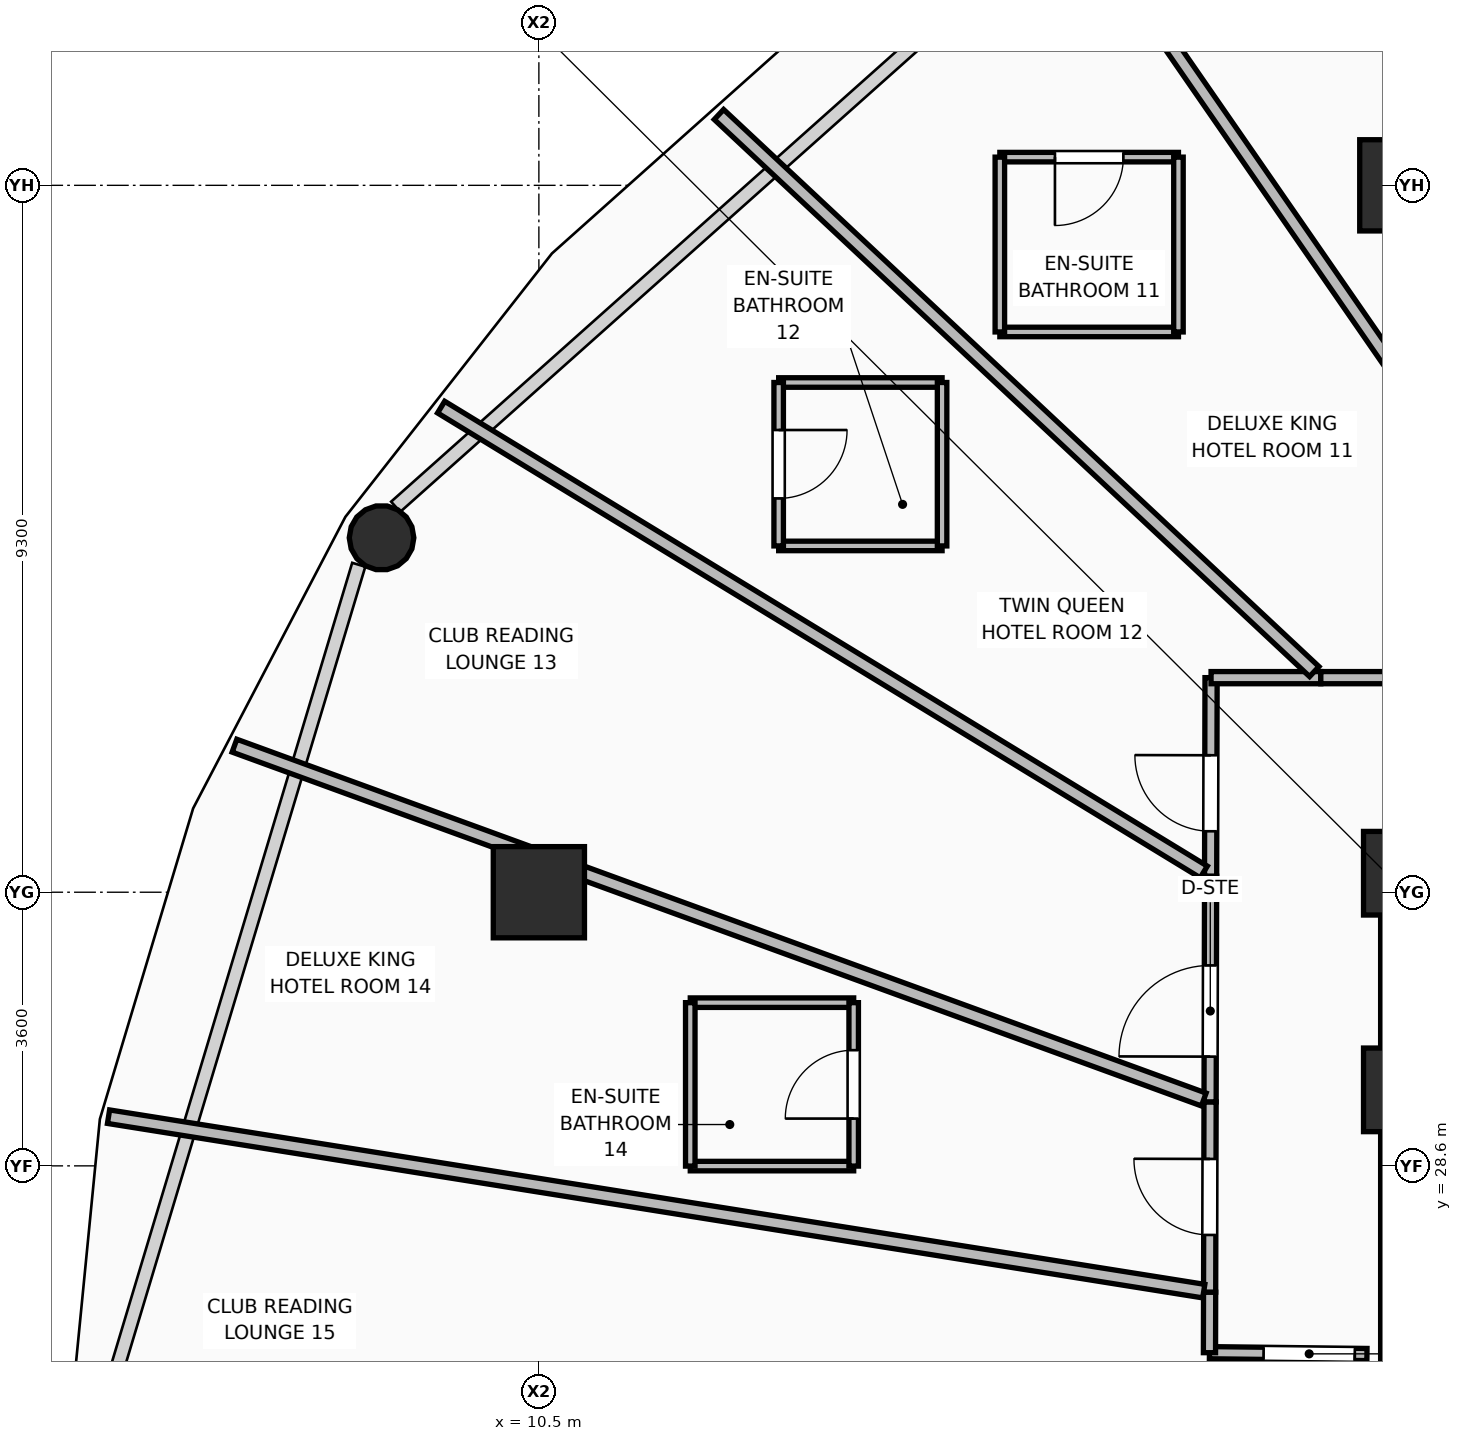
"""IFC4 building model, lengths in metres.
Left out: names, types, materials, properties, quantities, classifications, styles, units other than length and angle.
Written with IfcOpenShell. Run it as: python <this file> out.ifc"""

import sys

from ifc_helpers import new_model, si_unit, direction, frame, frame_2d, origin, origin_2d, place, context, subcontext, project, spatial, rectangle, hollow_rectangle, hollow_circle, extrude, element, fill, save


model = new_model("IFC4")
c1 = context("Model", 3, precision=1e-05, world=origin(), true_north=direction((0.0, 1.0)))
c2 = subcontext(c1, "Body", "Model", "MODEL_VIEW")
j1 = project(units=[si_unit("LENGTHUNIT", "METRE"), si_unit("PLANEANGLEUNIT", "RADIAN")], contexts=[c1])
p1 = place(None, origin())
s1 = spatial("IfcSite", under=j1, at=p1, CompositionType="ELEMENT")
p2 = place(p1, origin())
s2 = spatial("IfcBuilding", under=s1, at=p2, CompositionType="ELEMENT")
p3 = place(p2, frame((0.0, 0.0, 53.25)))
s3 = spatial("IfcBuildingStorey", under=s2, at=p3, CompositionType="ELEMENT", Elevation=53.25)
for number, where, z_axis, x_axis in (
    (1, (21.9, 29.6, 0.0), (0.0, 0.0, 1.0), (1.0, 0.0, 0.0)),
    (2, (21.9, 32.45, 0.0), (0.0, 0.0, 1.0), (1.0, 0.0, 0.0)),
):
    element("IfcColumn", number, at=place(p3, frame(where, z_axis=z_axis, x_axis=x_axis)), inside=s3, PredefinedType="COLUMN", context=c2, shape_type="SweptSolid", body=[
        extrude(rectangle(XDim=1.1, YDim=1.1, at=origin_2d()), origin(), (0.0, 0.0, 1.0), 3.75),
    ])
for number, where, z_axis, x_axis in (
    (3, (10.5, 32.2, 0.0), (0.0, 0.0, 1.0), (1.0, 0.0, 0.0)),
    (4, (21.9, 41.5, 0.0), (0.0, 0.0, 1.0), (1.0, 0.0, 0.0)),
):
    element("IfcColumn", number, at=place(p3, frame(where, z_axis=z_axis, x_axis=x_axis)), inside=s3, PredefinedType="COLUMN", context=c2, shape_type="SweptSolid", body=[
        extrude(hollow_rectangle(XDim=1.2, YDim=1.2, WallThickness=0.045, at=origin_2d()), origin(), (0.0, 0.0, 1.0), 3.75),
    ])
p4 = place(p3, frame((8.43, 36.863, 0.0), z_axis=(-0.192223999714, 0.099016391655, 0.976343017652), x_axis=(-0.45792701067, -0.888989793473, 0.0)))
e5 = element("IfcColumn", 5, at=p4, inside=s3, PredefinedType="COLUMN", context=c2, shape_type="SweptSolid", body=[
    extrude(hollow_circle(Radius=0.425, WallThickness=0.04, at=origin_2d()), origin(), (0.0, 0.0, 1.0), 3.656),
])
p5 = place(p3, frame((21.575, 32.45, 0.0), z_axis=(0.0, 0.0, 1.0), x_axis=(1.0, 0.0, 0.0)))
e6 = element("IfcWall", 6, at=p5, inside=s3, PredefinedType="SHEAR", context=c2, shape_type="SweptSolid", body=[
    extrude(rectangle(XDim=19.85, YDim=0.65, at=frame_2d((9.925, 0.0))), origin(), (0.0, 0.0, 1.0), 3.57),
])
p6 = place(p5, frame((2.175, 0.0, 0.0)))
e7 = element("IfcOpeningElement", 7, at=p6, cuts=e6, PredefinedType="OPENING", context=c2, shape_type="SweptSolid", body=[
    extrude(rectangle(XDim=1.1, YDim=2.1, at=frame_2d((0.55, 1.05))), frame((0.0, 0.335, 0.0), z_axis=(0.0, -1.0, 0.0), x_axis=(1.0, 0.0, 0.0)), (0.0, 0.0, 1.0), 0.67),
])
p7 = place(p5, frame((15.565, 0.0, 0.0)))
e8 = element("IfcOpeningElement", 8, at=p7, cuts=e6, PredefinedType="OPENING", context=c2, shape_type="SweptSolid", body=[
    extrude(rectangle(XDim=1.0, YDim=2.1, at=frame_2d((0.5, 1.05))), frame((0.0, 0.335, 0.0), z_axis=(0.0, -1.0, 0.0), x_axis=(1.0, 0.0, 0.0)), (0.0, 0.0, 1.0), 0.67),
])
p8 = place(p5, frame((17.575, 0.0, 0.0)))
e9 = element("IfcOpeningElement", 9, at=p8, cuts=e6, PredefinedType="OPENING", context=c2, shape_type="SweptSolid", body=[
    extrude(rectangle(XDim=0.9, YDim=2.1, at=frame_2d((0.45, 1.05))), frame((0.0, 0.335, 0.0), z_axis=(0.0, -1.0, 0.0), x_axis=(1.0, 0.0, 0.0)), (0.0, 0.0, 1.0), 0.67),
])
p9 = place(p3, frame((21.9, 18.125, 0.0), z_axis=(0.0, 0.0, 1.0), x_axis=(0.0, 1.0, 0.0)))
e10 = element("IfcWall", 10, at=p9, inside=s3, PredefinedType="SHEAR", context=c2, shape_type="SweptSolid", body=[
    extrude(rectangle(XDim=14.0, YDim=0.65, at=frame_2d((7.0, 0.0))), origin(), (0.0, 0.0, 1.0), 3.57),
])
p10 = place(p3, frame((21.395, 26.118, 0.0), z_axis=(0.0, 0.0, 1.0), x_axis=(-0.999931972005, 0.011664105718, 0.0)))
e11 = element("IfcWall", 11, at=p10, inside=s3, PredefinedType="PARTITIONING", context=c2, shape_type="SweptSolid", body=[
    extrude(rectangle(XDim=2.072, YDim=0.16, at=frame_2d((1.036, 0.0))), origin(), (0.0, 0.0, 1.0), 3.55),
])
p11 = place(p10, frame((0.16, 0.0, 0.0)))
e12 = element("IfcOpeningElement", 12, at=p11, cuts=e11, PredefinedType="OPENING", context=c2, shape_type="SweptSolid", body=[
    extrude(rectangle(XDim=1.2, YDim=2.1, at=frame_2d((0.6, 1.05))), frame((0.0, 0.09, 0.0), z_axis=(0.0, -1.0, 0.0), x_axis=(1.0, 0.0, 0.0)), (0.0, 0.0, 1.0), 0.18),
])
p12 = place(p3, frame((19.323, 26.142, 0.0), z_axis=(0.0, 0.0, 1.0), x_axis=(0.00245097303, 0.999996996361, 0.0)))
e13 = element("IfcWall", 13, at=p12, inside=s3, PredefinedType="PARTITIONING", context=c2, shape_type="SweptSolid", body=[
    extrude(rectangle(XDim=0.797, YDim=0.16, at=frame_2d((0.398, 0.0))), origin(), (0.0, 0.0, 1.0), 3.55),
])
p13 = place(p3, frame((19.325, 26.939, 0.0), z_axis=(0.0, 0.0, 1.0), x_axis=(0.002438541325, 0.999997026754, 0.0)))
e14 = element("IfcWall", 14, at=p13, inside=s3, PredefinedType="PARTITIONING", context=c2, shape_type="SweptSolid", body=[
    extrude(rectangle(XDim=2.503, YDim=0.16, at=frame_2d((1.251, 0.0))), origin(), (0.0, 0.0, 1.0), 3.55),
])
p14 = place(p13, frame((0.752, 0.0, 0.0)))
e15 = element("IfcOpeningElement", 15, at=p14, cuts=e14, PredefinedType="OPENING", context=c2, shape_type="SweptSolid", body=[
    extrude(rectangle(XDim=1.0, YDim=2.1, at=frame_2d((0.5, 1.05))), frame((0.0, 0.09, 0.0), z_axis=(0.0, -1.0, 0.0), x_axis=(1.0, 0.0, 0.0)), (0.0, 0.0, 1.0), 0.18),
])
p15 = place(p3, frame((19.331, 29.442, 0.0), z_axis=(0.0, 0.0, 1.0), x_axis=(0.002301489877, 0.999997351569, 0.0)))
e16 = element("IfcWall", 16, at=p15, inside=s3, PredefinedType="PARTITIONING", context=c2, shape_type="SweptSolid", body=[
    extrude(rectangle(XDim=2.97, YDim=0.16, at=frame_2d((1.485, 0.0))), origin(), (0.0, 0.0, 1.0), 3.55),
])
p16 = place(p15, frame((0.595, 0.0, 0.0)))
e17 = element("IfcOpeningElement", 17, at=p16, cuts=e16, PredefinedType="OPENING", context=c2, shape_type="SweptSolid", body=[
    extrude(rectangle(XDim=1.2, YDim=2.1, at=frame_2d((0.6, 1.05))), frame((0.0, 0.09, 0.0), z_axis=(0.0, -1.0, 0.0), x_axis=(1.0, 0.0, 0.0)), (0.0, 0.0, 1.0), 0.18),
])
p17 = place(p3, frame((19.338, 32.412, 0.0), z_axis=(0.0, 0.0, 1.0), x_axis=(0.002337753103, 0.999997267451, 0.0)))
e18 = element("IfcWall", 18, at=p17, inside=s3, PredefinedType="PARTITIONING", context=c2, shape_type="SweptSolid", body=[
    extrude(rectangle(XDim=2.611, YDim=0.16, at=frame_2d((1.305, 0.0))), origin(), (0.0, 0.0, 1.0), 2.928),
])
p18 = place(p17, frame((0.59, 0.0, 0.0)))
e19 = element("IfcOpeningElement", 19, at=p18, cuts=e18, PredefinedType="OPENING", context=c2, shape_type="SweptSolid", body=[
    extrude(rectangle(XDim=1.0, YDim=2.1, at=frame_2d((0.5, 1.05))), frame((0.0, 0.09, 0.0), z_axis=(0.0, -1.0, 0.0), x_axis=(1.0, 0.0, 0.0)), (0.0, 0.0, 1.0), 0.18),
])
p19 = place(p3, frame((19.344, 35.023, 0.0), z_axis=(0.0, 0.0, 1.0), x_axis=(1.0, 0.0, 0.0)))
e20 = element("IfcWall", 20, at=p19, inside=s3, PredefinedType="PARTITIONING", context=c2, shape_type="SweptSolid", body=[
    extrude(rectangle(XDim=1.444, YDim=0.16, at=frame_2d((0.722, 0.0))), origin(), (0.0, 0.0, 1.0), 3.55),
])
p20 = place(p3, frame((20.788, 35.023, 0.0), z_axis=(0.0, 0.0, 1.0), x_axis=(1.0, 0.0, 0.0)))
e21 = element("IfcWall", 21, at=p20, inside=s3, PredefinedType="PARTITIONING", context=c2, shape_type="SweptSolid", body=[
    extrude(rectangle(XDim=3.78, YDim=0.16, at=frame_2d((1.89, 0.0))), origin(), (0.0, 0.0, 1.0), 2.928),
])
p21 = place(p20, frame((2.186, 0.0, 0.0)))
e22 = element("IfcOpeningElement", 22, at=p21, cuts=e21, PredefinedType="OPENING", context=c2, shape_type="SweptSolid", body=[
    extrude(rectangle(XDim=1.0, YDim=2.1, at=frame_2d((0.5, 1.05))), frame((0.0, 0.09, 0.0), z_axis=(0.0, -1.0, 0.0), x_axis=(1.0, 0.0, 0.0)), (0.0, 0.0, 1.0), 0.18),
])
p22 = place(p3, frame((24.513, 35.103, 0.0), z_axis=(0.0, 0.0, 1.0), x_axis=(-0.568868408374, 0.822428558572, 0.0)))
e23 = element("IfcWall", 23, at=p22, inside=s3, PredefinedType="PARTITIONING", context=c2, shape_type="SweptSolid", body=[
    extrude(rectangle(XDim=12.676, YDim=0.18, at=frame_2d((6.338, 0.0))), origin(), (0.0, 0.0, 1.0), 2.775),
])
p23 = place(p3, frame((20.702, 35.103, 0.0), z_axis=(0.0, 0.0, 1.0), x_axis=(-0.730215371194, 0.683217031164, 0.0)))
e24 = element("IfcWall", 24, at=p23, inside=s3, PredefinedType="PARTITIONING", context=c2, shape_type="SweptSolid", body=[
    extrude(rectangle(XDim=10.727, YDim=0.18, at=frame_2d((5.364, 0.0))), origin(), (0.0, 0.0, 1.0), 2.775),
])
p24 = place(p3, frame((19.248, 32.467, 0.0), z_axis=(0.0, 0.0, 1.0), x_axis=(-0.853919589257, 0.520404972192, 0.0)))
e25 = element("IfcWall", 25, at=p24, inside=s3, PredefinedType="PARTITIONING", context=c2, shape_type="SweptSolid", body=[
    extrude(rectangle(XDim=11.75, YDim=0.18, at=frame_2d((5.875, 0.0))), origin(), (0.0, 0.0, 1.0), 2.775),
])
p25 = place(p3, frame((19.248, 29.473, 0.0), z_axis=(0.0, 0.0, 1.0), x_axis=(-0.939376353179, 0.34288783456, 0.0)))
e26 = element("IfcWall", 26, at=p25, inside=s3, PredefinedType="PARTITIONING", context=c2, shape_type="SweptSolid", body=[
    extrude(rectangle(XDim=13.576, YDim=0.18, at=frame_2d((6.788, 0.0))), origin(), (0.0, 0.0, 1.0), 2.775),
])
p26 = place(p3, frame((19.248, 26.952, 0.0), z_axis=(0.0, 0.0, 1.0), x_axis=(-0.987552205461, 0.157291581112, 0.0)))
e27 = element("IfcWall", 27, at=p26, inside=s3, PredefinedType="PARTITIONING", context=c2, shape_type="SweptSolid", body=[
    extrude(rectangle(XDim=14.592, YDim=0.18, at=frame_2d((7.296, 0.0))), origin(), (0.0, 0.0, 1.0), 2.775),
])
p27 = place(p3, frame((16.565, 39.571, 0.0), z_axis=(0.0, 0.0, 1.0), x_axis=(1.0, 0.0, 0.0)))
e28 = element("IfcWall", 28, at=p27, inside=s3, PredefinedType="PARTITIONING", context=c2, shape_type="SweptSolid", body=[
    extrude(rectangle(XDim=2.35, YDim=0.125, at=frame_2d((1.175, 0.0))), origin(), (0.0, 0.0, 1.0), 3.55),
])
p28 = place(p3, frame((16.565, 41.871, 0.0), z_axis=(0.0, 0.0, 1.0), x_axis=(1.0, 0.0, 0.0)))
e29 = element("IfcWall", 29, at=p28, inside=s3, PredefinedType="PARTITIONING", context=c2, shape_type="SweptSolid", body=[
    extrude(rectangle(XDim=2.35, YDim=0.125, at=frame_2d((1.175, 0.0))), origin(), (0.0, 0.0, 1.0), 2.928),
])
p29 = place(p28, frame((0.725, 0.0, 0.0)))
e30 = element("IfcOpeningElement", 30, at=p29, cuts=e29, PredefinedType="OPENING", context=c2, shape_type="SweptSolid", body=[
    extrude(rectangle(XDim=0.9, YDim=2.1, at=frame_2d((0.45, 1.05))), frame((0.0, 0.073, 0.0), z_axis=(0.0, -1.0, 0.0), x_axis=(1.0, 0.0, 0.0)), (0.0, 0.0, 1.0), 0.145),
])
p30 = place(p3, frame((16.565, 39.571, 0.0), z_axis=(0.0, 0.0, 1.0), x_axis=(0.0, 1.0, 0.0)))
e31 = element("IfcWall", 31, at=p30, inside=s3, PredefinedType="PARTITIONING", context=c2, shape_type="SweptSolid", body=[
    extrude(rectangle(XDim=2.3, YDim=0.125, at=frame_2d((1.15, 0.0))), origin(), (0.0, 0.0, 1.0), 3.55),
])
p31 = place(p3, frame((18.915, 39.571, 0.0), z_axis=(0.0, 0.0, 1.0), x_axis=(0.0, 1.0, 0.0)))
e32 = element("IfcWall", 32, at=p31, inside=s3, PredefinedType="PARTITIONING", context=c2, shape_type="SweptSolid", body=[
    extrude(rectangle(XDim=2.3, YDim=0.125, at=frame_2d((1.15, 0.0))), origin(), (0.0, 0.0, 1.0), 2.928),
])
for number, where, z_axis, x_axis in (
    (33, (13.655, 36.756, 0.0), (0.0, 0.0, 1.0), (1.0, 0.0, 0.0)),
    (34, (13.655, 38.906, 0.0), (0.0, 0.0, 1.0), (1.0, 0.0, 0.0)),
):
    element("IfcWall", number, at=place(p3, frame(where, z_axis=z_axis, x_axis=x_axis)), inside=s3, PredefinedType="PARTITIONING", context=c2, shape_type="SweptSolid", body=[
        extrude(rectangle(XDim=2.15, YDim=0.125, at=frame_2d((1.075, 0.0))), origin(), (0.0, 0.0, 1.0), 3.55),
    ])
p32 = place(p3, frame((13.655, 36.756, 0.0), z_axis=(0.0, 0.0, 1.0), x_axis=(0.0, 1.0, 0.0)))
e35 = element("IfcWall", 35, at=p32, inside=s3, PredefinedType="PARTITIONING", context=c2, shape_type="SweptSolid", body=[
    extrude(rectangle(XDim=2.15, YDim=0.125, at=frame_2d((1.075, 0.0))), origin(), (0.0, 0.0, 1.0), 3.55),
])
p33 = place(p32, frame((0.625, 0.0, 0.0)))
e36 = element("IfcOpeningElement", 36, at=p33, cuts=e35, PredefinedType="OPENING", context=c2, shape_type="SweptSolid", body=[
    extrude(rectangle(XDim=0.9, YDim=2.1, at=frame_2d((0.45, 1.05))), frame((0.0, 0.073, 0.0), z_axis=(0.0, -1.0, 0.0), x_axis=(1.0, 0.0, 0.0)), (0.0, 0.0, 1.0), 0.145),
])
p34 = place(p3, frame((15.805, 36.756, 0.0), z_axis=(0.0, 0.0, 1.0), x_axis=(0.0, 1.0, 0.0)))
e37 = element("IfcWall", 37, at=p34, inside=s3, PredefinedType="PARTITIONING", context=c2, shape_type="SweptSolid", body=[
    extrude(rectangle(XDim=2.15, YDim=0.125, at=frame_2d((1.075, 0.0))), origin(), (0.0, 0.0, 1.0), 3.55),
])
for number, where, z_axis, x_axis in (
    (38, (12.492, 28.597, 0.0), (0.0, 0.0, 1.0), (1.0, 0.0, 0.0)),
    (39, (12.492, 30.747, 0.0), (0.0, 0.0, 1.0), (1.0, 0.0, 0.0)),
    (40, (12.492, 28.597, 0.0), (0.0, 0.0, 1.0), (0.0, 1.0, 0.0)),
):
    element("IfcWall", number, at=place(p3, frame(where, z_axis=z_axis, x_axis=x_axis)), inside=s3, PredefinedType="PARTITIONING", context=c2, shape_type="SweptSolid", body=[
        extrude(rectangle(XDim=2.15, YDim=0.125, at=frame_2d((1.075, 0.0))), origin(), (0.0, 0.0, 1.0), 3.55),
    ])
p35 = place(p3, frame((14.642, 28.597, 0.0), z_axis=(0.0, 0.0, 1.0), x_axis=(0.0, 1.0, 0.0)))
e41 = element("IfcWall", 41, at=p35, inside=s3, PredefinedType="PARTITIONING", context=c2, shape_type="SweptSolid", body=[
    extrude(rectangle(XDim=2.15, YDim=0.125, at=frame_2d((1.075, 0.0))), origin(), (0.0, 0.0, 1.0), 3.55),
])
p36 = place(p35, frame((0.625, 0.0, 0.0)))
e42 = element("IfcOpeningElement", 42, at=p36, cuts=e41, PredefinedType="OPENING", context=c2, shape_type="SweptSolid", body=[
    extrude(rectangle(XDim=0.9, YDim=2.1, at=frame_2d((0.45, 1.05))), frame((0.0, 0.073, 0.0), z_axis=(0.0, -1.0, 0.0), x_axis=(1.0, 0.0, 0.0)), (0.0, 0.0, 1.0), 0.145),
])
p37 = place(p29, frame((0.9, 0.0, 0.0), z_axis=(0.0, 0.0, 1.0), x_axis=(-1.0, 0.0, 0.0)))
e43 = element("IfcDoor", 43, at=p37, inside=s3, OperationType="SINGLE_SWING_RIGHT", PredefinedType="DOOR", context=c2, shape_type="SweptSolid", body=[
    extrude(rectangle(XDim=0.9, YDim=2.1, at=frame_2d((0.45, 1.05))), frame((0.0, 0.025, 0.0), z_axis=(0.0, -1.0, 0.0), x_axis=(1.0, 0.0, 0.0)), (0.0, 0.0, 1.0), 0.05),
])
fill(e30, e43)
p38 = place(p33, frame((0.9, 0.0, 0.0), z_axis=(0.0, 0.0, 1.0), x_axis=(-1.0, 0.0, 0.0)))
e44 = element("IfcDoor", 44, at=p38, inside=s3, OperationType="SINGLE_SWING_LEFT", PredefinedType="DOOR", context=c2, shape_type="SweptSolid", body=[
    extrude(rectangle(XDim=0.9, YDim=2.1, at=frame_2d((0.45, 1.05))), frame((0.0, 0.025, 0.0), z_axis=(0.0, -1.0, 0.0), x_axis=(1.0, 0.0, 0.0)), (0.0, 0.0, 1.0), 0.05),
])
fill(e36, e44)
p39 = place(p18, origin())
e45 = element("IfcDoor", 45, at=p39, inside=s3, OperationType="SINGLE_SWING_RIGHT", PredefinedType="DOOR", context=c2, shape_type="SweptSolid", body=[
    extrude(rectangle(XDim=1.0, YDim=2.1, at=frame_2d((0.5, 1.05))), frame((0.0, 0.025, 0.0), z_axis=(0.0, -1.0, 0.0), x_axis=(1.0, 0.0, 0.0)), (0.0, 0.0, 1.0), 0.05),
])
fill(e19, e45)
p40 = place(p16, origin())
e46 = element("IfcDoor", 46, at=p40, inside=s3, OperationType="SINGLE_SWING_LEFT", PredefinedType="DOOR", context=c2, shape_type="SweptSolid", body=[
    extrude(rectangle(XDim=1.2, YDim=2.1, at=frame_2d((0.6, 1.05))), frame((0.0, 0.025, 0.0), z_axis=(0.0, -1.0, 0.0), x_axis=(1.0, 0.0, 0.0)), (0.0, 0.0, 1.0), 0.05),
])
fill(e17, e46)
p41 = place(p36, origin())
e47 = element("IfcDoor", 47, at=p41, inside=s3, OperationType="SINGLE_SWING_LEFT", PredefinedType="DOOR", context=c2, shape_type="SweptSolid", body=[
    extrude(rectangle(XDim=0.9, YDim=2.1, at=frame_2d((0.45, 1.05))), frame((0.0, 0.025, 0.0), z_axis=(0.0, -1.0, 0.0), x_axis=(1.0, 0.0, 0.0)), (0.0, 0.0, 1.0), 0.05),
])
fill(e42, e47)
p42 = place(p14, origin())
e48 = element("IfcDoor", 48, at=p42, inside=s3, OperationType="SINGLE_SWING_RIGHT", PredefinedType="DOOR", context=c2, shape_type="SweptSolid", body=[
    extrude(rectangle(XDim=1.0, YDim=2.1, at=frame_2d((0.5, 1.05))), frame((0.0, 0.025, 0.0), z_axis=(0.0, -1.0, 0.0), x_axis=(1.0, 0.0, 0.0)), (0.0, 0.0, 1.0), 0.05),
])
fill(e15, e48)
p43 = place(p11, origin())
e49 = element("IfcDoor", 49, at=p43, inside=s3, OperationType="SINGLE_SWING_LEFT", PredefinedType="DOOR", context=c2, shape_type="SweptSolid", body=[
    extrude(rectangle(XDim=1.2, YDim=2.1, at=frame_2d((0.6, 1.05))), frame((0.0, 0.025, 0.0), z_axis=(0.0, -1.0, 0.0), x_axis=(1.0, 0.0, 0.0)), (0.0, 0.0, 1.0), 0.05),
])
fill(e12, e49)
save(model, sys.argv[1])
